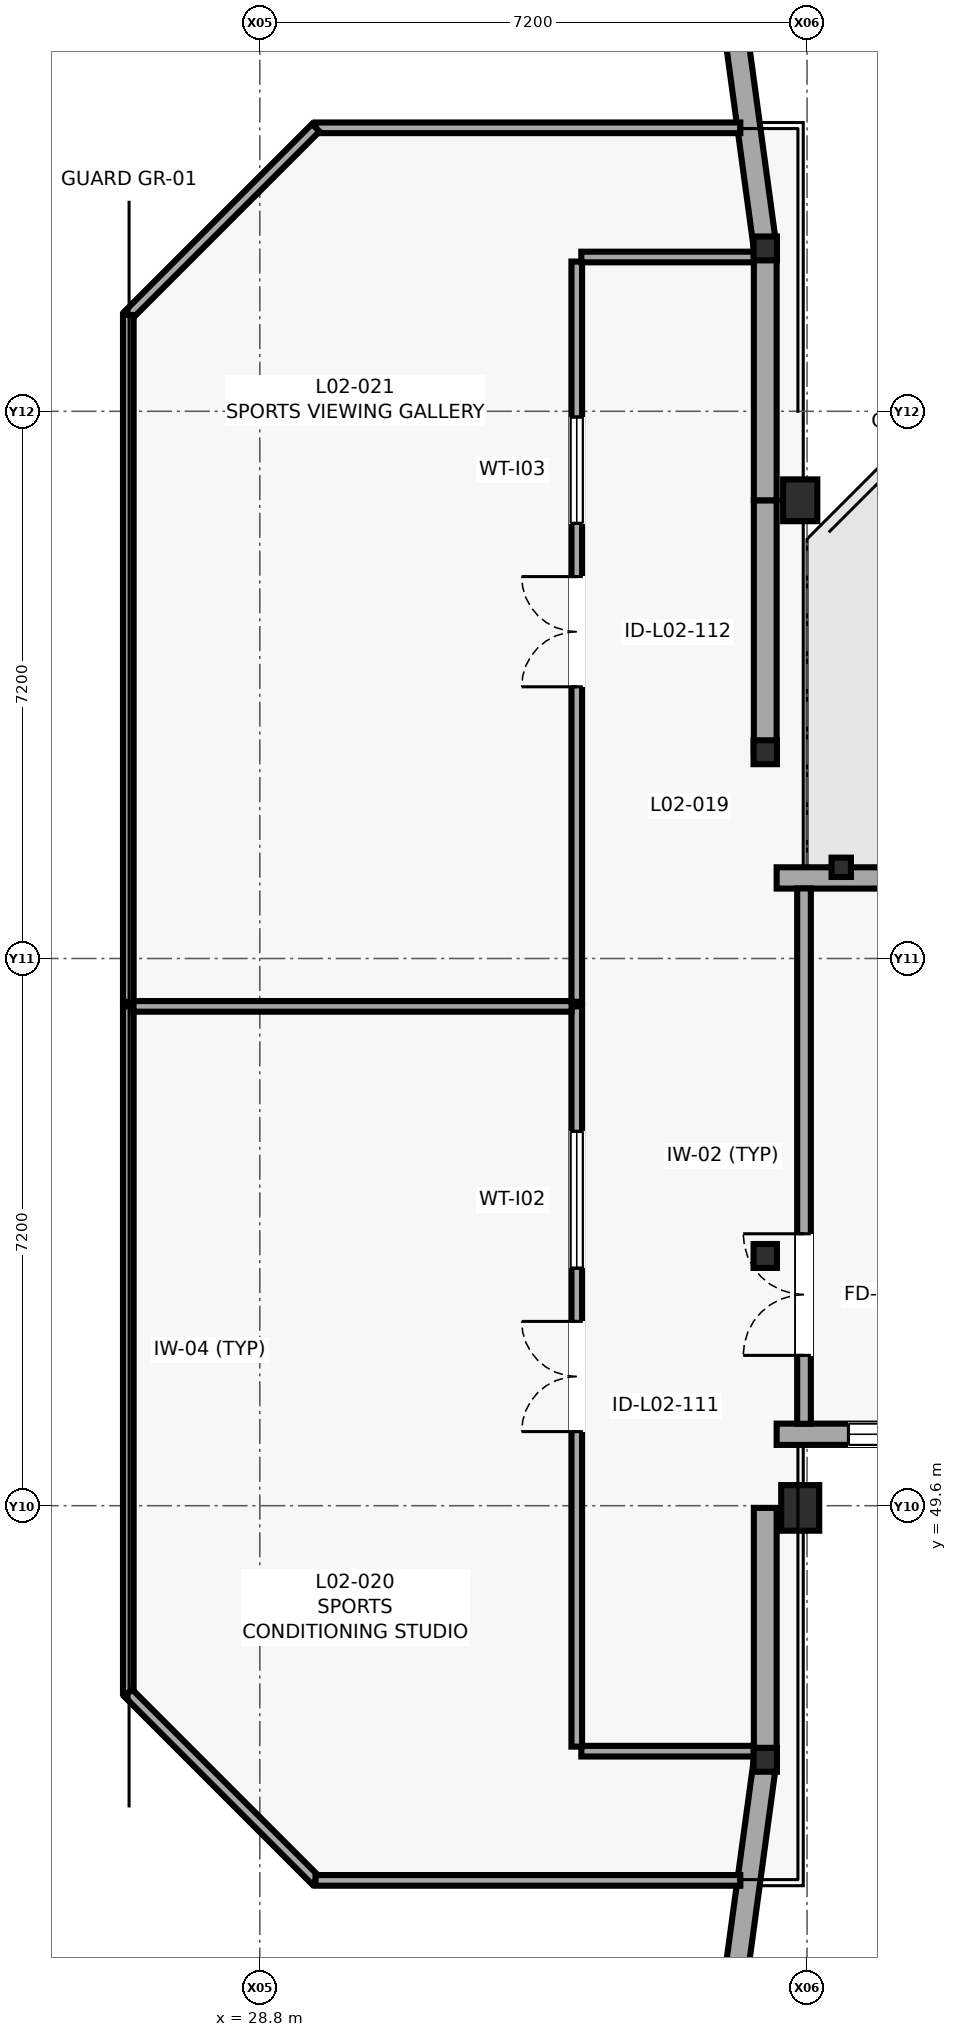
"""IFC4 building model, lengths in metres.
Left out: names, types, materials, properties, quantities, classifications, styles, units other than length and angle.
Written with IfcOpenShell. Run it as: python <this file> out.ifc"""

import sys

from ifc_helpers import new_model, si_unit, direction, frame, frame_2d, origin, origin_2d, place, context, subcontext, project, spatial, rectangle, i_section, extrude, element, fill, save


model = new_model("IFC4")
c1 = context("Model", 3, precision=1e-05, world=origin(), true_north=direction((0.0, 1.0)))
c2 = subcontext(c1, "Body", "Model", "MODEL_VIEW")
j1 = project(units=[si_unit("LENGTHUNIT", "METRE"), si_unit("PLANEANGLEUNIT", "RADIAN")], contexts=[c1])
p1 = place(None, origin())
s1 = spatial("IfcSite", under=j1, at=p1, CompositionType="ELEMENT")
p2 = place(p1, origin())
s2 = spatial("IfcBuilding", under=s1, at=p2, CompositionType="ELEMENT")
p3 = place(p2, frame((0.0, 0.0, 8.2)))
s3 = spatial("IfcBuildingStorey", under=s2, at=p3, CompositionType="ELEMENT", Elevation=8.2)
for number, where, z_axis, x_axis in (
    (1, (35.45, 46.257, 0.0), (0.0, 0.0, 1.0), (1.0, 0.0, 0.0)),
    (2, (35.45, 52.886, 0.0), (0.0, 0.0, 1.0), (1.0, 0.0, 0.0)),
    (3, (35.45, 59.514, 0.0), (0.0, 0.0, 1.0), (1.0, 0.0, 0.0)),
    (4, (35.45, 66.143, 0.0), (0.0, 0.0, 1.0), (1.0, 0.0, 0.0)),
):
    element("IfcColumn", number, at=place(p3, frame(where, z_axis=z_axis, x_axis=x_axis)), inside=s3, PredefinedType="COLUMN", context=c2, shape_type="SweptSolid", body=[
        extrude(i_section(OverallWidth=0.307, OverallDepth=0.314, WebThickness=0.012, FlangeThickness=0.019, FilletRadius=0.015, at=origin_2d()), origin(), (0.0, 0.0, 1.0), 4.0),
    ])
p4 = place(p3, frame((35.91, 49.571, 0.0), z_axis=(0.0, 0.0, 1.0), x_axis=(1.0, 0.0, 0.0)))
e5 = element("IfcColumn", 5, at=p4, inside=s3, PredefinedType="PILASTER", context=c2, shape_type="SweptSolid", body=[
    extrude(rectangle(XDim=0.5, YDim=0.6, at=origin_2d()), origin(), (0.0, 0.0, 1.0), 4.0),
])
p5 = place(p3, frame((35.91, 62.829, 0.0), z_axis=(0.0, 0.0, 1.0), x_axis=(1.0, 0.0, 0.0)))
e6 = element("IfcColumn", 6, at=p5, inside=s3, PredefinedType="PILASTER", context=c2, shape_type="SweptSolid", body=[
    extrude(rectangle(XDim=0.45, YDim=0.55, at=origin_2d()), origin(), (0.0, 0.0, 1.0), 4.0),
])
p6 = place(p3, frame((36.45, 58.0, 0.0), z_axis=(0.0, 0.0, 1.0), x_axis=(1.0, 0.0, 0.0)))
e7 = element("IfcColumn", 7, at=p6, inside=s3, PredefinedType="COLUMN", context=c2, shape_type="SweptSolid", body=[
    extrude(i_section(OverallWidth=0.255, OverallDepth=0.254, WebThickness=0.009, FlangeThickness=0.014, FilletRadius=0.013, at=origin_2d()), origin(), (0.0, 0.0, 1.0), 4.0),
])
p7 = place(p3, frame((35.0, 42.943, 0.0), z_axis=(0.0, 0.0, 1.0), x_axis=(0.134539839792, 0.990908185206, 0.0)))
e8 = element("IfcWall", 8, at=p7, inside=s3, PredefinedType="SOLIDWALL", context=c2, shape_type="SweptSolid", body=[
    extrude(rectangle(XDim=3.344, YDim=0.3, at=frame_2d((1.672, 0.0))), origin(), (0.0, 0.0, 1.0), 3.745),
])
p8 = place(p3, frame((35.45, 46.257, 0.0), z_axis=(0.0, 0.0, 1.0), x_axis=(0.0, 1.0, 0.0)))
e9 = element("IfcWall", 9, at=p8, inside=s3, PredefinedType="SOLIDWALL", context=c2, shape_type="SweptSolid", body=[
    extrude(rectangle(XDim=3.314, YDim=0.3, at=frame_2d((1.657, 0.0))), origin(), (0.0, 0.0, 1.0), 3.505),
])
p9 = place(p3, frame((35.45, 59.514, 0.0), z_axis=(0.0, 0.0, 1.0), x_axis=(0.0, 1.0, 0.0)))
e10 = element("IfcWall", 10, at=p9, inside=s3, PredefinedType="SOLIDWALL", context=c2, shape_type="SweptSolid", body=[
    extrude(rectangle(XDim=3.315, YDim=0.3, at=frame_2d((1.658, 0.0))), origin(), (0.0, 0.0, 1.0), 3.505),
])
p10 = place(p3, frame((35.45, 62.829, 0.0), z_axis=(0.0, 0.0, 1.0), x_axis=(0.0, 1.0, 0.0)))
e11 = element("IfcWall", 11, at=p10, inside=s3, PredefinedType="SOLIDWALL", context=c2, shape_type="SweptSolid", body=[
    extrude(rectangle(XDim=3.314, YDim=0.3, at=frame_2d((1.657, 0.0))), origin(), (0.0, 0.0, 1.0), 3.505),
])
p11 = place(p3, frame((35.45, 66.143, 0.0), z_axis=(0.0, 0.0, 1.0), x_axis=(-0.134539839792, 0.990908185206, 0.0)))
e12 = element("IfcWall", 12, at=p11, inside=s3, PredefinedType="SOLIDWALL", context=c2, shape_type="SweptSolid", body=[
    extrude(rectangle(XDim=3.344, YDim=0.3, at=frame_2d((1.672, 0.0))), origin(), (0.0, 0.0, 1.0), 3.745),
])
p12 = place(p3, frame((43.48, 57.86, 0.0), z_axis=(0.0, 0.0, 1.0), x_axis=(-1.0, 0.0, 0.0)))
e13 = element("IfcWall", 13, at=p12, inside=s3, PredefinedType="SOLIDWALL", context=c2, shape_type="SweptSolid", body=[
    extrude(rectangle(XDim=7.88, YDim=0.28, at=frame_2d((3.94, 0.0))), origin(), (0.0, 0.0, 1.0), 2.96),
])
p13 = place(p12, frame((1.12, 0.0, 0.85)))
e14 = element("IfcOpeningElement", 14, at=p13, cuts=e13, PredefinedType="OPENING", context=c2, shape_type="SweptSolid", body=[
    extrude(rectangle(XDim=1.7, YDim=1.75, at=frame_2d((0.85, 0.875))), frame((0.0, 0.15, 0.0), z_axis=(0.0, -1.0, 0.0), x_axis=(1.0, 0.0, 0.0)), (0.0, 0.0, 1.0), 0.3),
])
p14 = place(p12, frame((4.51, 0.0, 0.85)))
e15 = element("IfcOpeningElement", 15, at=p14, cuts=e13, PredefinedType="OPENING", context=c2, shape_type="SweptSolid", body=[
    extrude(rectangle(XDim=1.9, YDim=1.65, at=frame_2d((0.95, 0.825))), frame((0.0, 0.15, 0.0), z_axis=(0.0, -1.0, 0.0), x_axis=(1.0, 0.0, 0.0)), (0.0, 0.0, 1.0), 0.3),
])
p15 = place(p3, frame((35.6, 50.54, 0.0), z_axis=(0.0, 0.0, 1.0), x_axis=(1.0, 0.0, 0.0)))
e16 = element("IfcWall", 16, at=p15, inside=s3, PredefinedType="SOLIDWALL", context=c2, shape_type="SweptSolid", body=[
    extrude(rectangle(XDim=7.88, YDim=0.28, at=frame_2d((3.94, 0.0))), origin(), (0.0, 0.0, 1.0), 3.78),
])
p16 = place(p15, frame((0.945, 0.0, 1.05)))
e17 = element("IfcOpeningElement", 17, at=p16, cuts=e16, PredefinedType="OPENING", context=c2, shape_type="SweptSolid", body=[
    extrude(rectangle(XDim=2.05, YDim=1.55, at=frame_2d((1.025, 0.775))), frame((0.0, 0.15, 0.0), z_axis=(0.0, -1.0, 0.0), x_axis=(1.0, 0.0, 0.0)), (0.0, 0.0, 1.0), 0.3),
])
p17 = place(p15, frame((4.76, 0.0, 1.05)))
e18 = element("IfcOpeningElement", 18, at=p17, cuts=e16, PredefinedType="OPENING", context=c2, shape_type="SweptSolid", body=[
    extrude(rectangle(XDim=2.3, YDim=1.45, at=frame_2d((1.15, 0.725))), frame((0.0, 0.15, 0.0), z_axis=(0.0, -1.0, 0.0), x_axis=(1.0, 0.0, 0.0)), (0.0, 0.0, 1.0), 0.3),
])
p18 = place(p3, frame((35.96, 50.678, 0.0), z_axis=(0.0, 0.0, 1.0), x_axis=(0.0, 1.0, 0.0)))
e19 = element("IfcWall", 19, at=p18, inside=s3, PredefinedType="PARTITIONING", context=c2, shape_type="SweptSolid", body=[
    extrude(rectangle(XDim=7.044, YDim=0.18, at=frame_2d((3.522, 0.0))), origin(), (0.0, 0.0, 1.0), 3.78),
])
p19 = place(p18, frame((0.9, 0.0, 0.0)))
e20 = element("IfcOpeningElement", 20, at=p19, cuts=e19, PredefinedType="OPENING", context=c2, shape_type="SweptSolid", body=[
    extrude(rectangle(XDim=1.6, YDim=2.25, at=frame_2d((0.8, 1.125))), frame((0.0, 0.1, 0.0), z_axis=(0.0, -1.0, 0.0), x_axis=(1.0, 0.0, 0.0)), (0.0, 0.0, 1.0), 0.2),
])
p20 = place(p3, frame((27.07, 56.17, 0.0), z_axis=(0.0, 0.0, 1.0), x_axis=(0.0, -1.0, 0.0)))
e21 = element("IfcWall", 21, at=p20, inside=s3, PredefinedType="PARTITIONING", context=c2, shape_type="SweptSolid", body=[
    extrude(rectangle(XDim=9.035, YDim=0.14, at=frame_2d((4.518, 0.0))), origin(), (0.0, 0.0, 1.0), 3.755),
])
p21 = place(p3, frame((27.069, 47.136, 0.0), z_axis=(0.0, 0.0, 1.0), x_axis=(0.707071776767, -0.707141783873, 0.0)))
e22 = element("IfcWall", 22, at=p21, inside=s3, PredefinedType="PARTITIONING", context=c2, shape_type="SweptSolid", body=[
    extrude(rectangle(XDim=3.487, YDim=0.14, at=frame_2d((1.744, 0.0))), origin(), (0.0, 0.0, 1.0), 3.755),
])
p22 = place(p3, frame((29.533, 44.67, 0.0), z_axis=(0.0, 0.0, 1.0), x_axis=(1.0, 0.0, 0.0)))
e23 = element("IfcWall", 23, at=p22, inside=s3, PredefinedType="PARTITIONING", context=c2, shape_type="SweptSolid", body=[
    extrude(rectangle(XDim=5.589, YDim=0.14, at=frame_2d((2.794, 0.0))), origin(), (0.0, 0.0, 1.0), 3.755),
])
p23 = place(p3, frame((35.302, 46.37, 0.0), z_axis=(0.0, 0.0, 1.0), x_axis=(-1.0, 0.0, 0.0)))
e24 = element("IfcWall", 24, at=p23, inside=s3, PredefinedType="PARTITIONING", context=c2, shape_type="SweptSolid", body=[
    extrude(rectangle(XDim=2.272, YDim=0.14, at=frame_2d((1.136, 0.0))), origin(), (0.0, 0.0, 1.0), 3.755),
])
p24 = place(p3, frame((32.97, 46.43, 0.0), z_axis=(0.0, 0.0, 1.0), x_axis=(0.0, 1.0, 0.0)))
e25 = element("IfcWall", 25, at=p24, inside=s3, PredefinedType="PARTITIONING", context=c2, shape_type="SweptSolid", body=[
    extrude(rectangle(XDim=9.74, YDim=0.14, at=frame_2d((4.87, 0.0))), origin(), (0.0, 0.0, 1.0), 3.755),
])
p25 = place(p24, frame((4.145, 0.0, 0.0)))
e26 = element("IfcOpeningElement", 26, at=p25, cuts=e25, PredefinedType="OPENING", context=c2, shape_type="SweptSolid", body=[
    extrude(rectangle(XDim=1.45, YDim=2.28, at=frame_2d((0.725, 1.14))), frame((0.0, 0.08, 0.0), z_axis=(0.0, -1.0, 0.0), x_axis=(1.0, 0.0, 0.0)), (0.0, 0.0, 1.0), 0.16),
])
p26 = place(p24, frame((6.295, 0.0, 1.05)))
e27 = element("IfcOpeningElement", 27, at=p26, cuts=e25, PredefinedType="OPENING", context=c2, shape_type="SweptSolid", body=[
    extrude(rectangle(XDim=1.8, YDim=1.2, at=frame_2d((0.9, 0.6))), frame((0.0, 0.08, 0.0), z_axis=(0.0, -1.0, 0.0), x_axis=(1.0, 0.0, 0.0)), (0.0, 0.0, 1.0), 0.16),
])
p27 = place(p3, frame((32.902, 56.17, 0.0), z_axis=(0.0, 0.0, 1.0), x_axis=(-1.0, 0.0, 0.0)))
e28 = element("IfcWall", 28, at=p27, inside=s3, PredefinedType="PARTITIONING", context=c2, shape_type="SweptSolid", body=[
    extrude(rectangle(XDim=5.764, YDim=0.14, at=frame_2d((2.882, 0.0))), origin(), (0.0, 0.0, 1.0), 3.755),
])
p28 = place(p3, frame((35.122, 67.73, 0.0), z_axis=(0.0, 0.0, 1.0), x_axis=(-1.0, 0.0, 0.0)))
e29 = element("IfcWall", 29, at=p28, inside=s3, PredefinedType="PARTITIONING", context=c2, shape_type="SweptSolid", body=[
    extrude(rectangle(XDim=5.587, YDim=0.14, at=frame_2d((2.793, 0.0))), origin(), (0.0, 0.0, 1.0), 3.755),
])
p29 = place(p3, frame((29.536, 67.731, 0.0), z_axis=(0.0, 0.0, 1.0), x_axis=(-0.707071776767, -0.707141783873, 0.0)))
e30 = element("IfcWall", 30, at=p29, inside=s3, PredefinedType="PARTITIONING", context=c2, shape_type="SweptSolid", body=[
    extrude(rectangle(XDim=3.487, YDim=0.14, at=frame_2d((1.744, 0.0))), origin(), (0.0, 0.0, 1.0), 3.755),
])
p30 = place(p3, frame((27.07, 65.267, 0.0), z_axis=(0.0, 0.0, 1.0), x_axis=(0.0, -1.0, 0.0)))
e31 = element("IfcWall", 31, at=p30, inside=s3, PredefinedType="PARTITIONING", context=c2, shape_type="SweptSolid", body=[
    extrude(rectangle(XDim=9.037, YDim=0.14, at=frame_2d((4.519, 0.0))), origin(), (0.0, 0.0, 1.0), 3.755),
])
p31 = place(p3, frame((32.97, 56.23, 0.0), z_axis=(0.0, 0.0, 1.0), x_axis=(0.0, 1.0, 0.0)))
e32 = element("IfcWall", 32, at=p31, inside=s3, PredefinedType="PARTITIONING", context=c2, shape_type="SweptSolid", body=[
    extrude(rectangle(XDim=9.74, YDim=0.14, at=frame_2d((4.87, 0.0))), origin(), (0.0, 0.0, 1.0), 3.755),
])
p32 = place(p31, frame((4.145, 0.0, 0.0)))
e33 = element("IfcOpeningElement", 33, at=p32, cuts=e32, PredefinedType="OPENING", context=c2, shape_type="SweptSolid", body=[
    extrude(rectangle(XDim=1.45, YDim=2.28, at=frame_2d((0.725, 1.14))), frame((0.0, 0.08, 0.0), z_axis=(0.0, -1.0, 0.0), x_axis=(1.0, 0.0, 0.0)), (0.0, 0.0, 1.0), 0.16),
])
p33 = place(p31, frame((6.295, 0.0, 1.05)))
e34 = element("IfcOpeningElement", 34, at=p33, cuts=e32, PredefinedType="OPENING", context=c2, shape_type="SweptSolid", body=[
    extrude(rectangle(XDim=1.4, YDim=1.05, at=frame_2d((0.7, 0.525))), frame((0.0, 0.08, 0.0), z_axis=(0.0, -1.0, 0.0), x_axis=(1.0, 0.0, 0.0)), (0.0, 0.0, 1.0), 0.16),
])
p34 = place(p3, frame((33.03, 66.03, 0.0), z_axis=(0.0, 0.0, 1.0), x_axis=(1.0, 0.0, 0.0)))
e35 = element("IfcWall", 35, at=p34, inside=s3, PredefinedType="PARTITIONING", context=c2, shape_type="SweptSolid", body=[
    extrude(rectangle(XDim=2.272, YDim=0.14, at=frame_2d((1.136, 0.0))), origin(), (0.0, 0.0, 1.0), 3.755),
])
p35 = place(p16, origin())
e36 = element("IfcWindow", 36, at=p35, inside=s3, PartitioningType="SINGLE_PANEL", PredefinedType="WINDOW", context=c2, shape_type="SweptSolid", body=[
    extrude(rectangle(XDim=2.05, YDim=1.55, at=frame_2d((1.025, 0.775))), frame((0.0, 0.03, 0.0), z_axis=(0.0, -1.0, 0.0), x_axis=(1.0, 0.0, 0.0)), (0.0, 0.0, 1.0), 0.06),
])
fill(e17, e36)
p36 = place(p19, origin())
e37 = element("IfcDoor", 37, at=p36, inside=s3, OperationType="DOUBLE_DOOR_SINGLE_SWING", PredefinedType="DOOR", context=c2, shape_type="SweptSolid", body=[
    extrude(rectangle(XDim=1.6, YDim=2.25, at=frame_2d((0.8, 1.125))), frame((0.0, 0.025, 0.0), z_axis=(0.0, -1.0, 0.0), x_axis=(1.0, 0.0, 0.0)), (0.0, 0.0, 1.0), 0.05),
])
fill(e20, e37)
p37 = place(p25, origin())
e38 = element("IfcDoor", 38, at=p37, inside=s3, OperationType="DOUBLE_DOOR_SINGLE_SWING", PredefinedType="DOOR", context=c2, shape_type="SweptSolid", body=[
    extrude(rectangle(XDim=1.45, YDim=2.28, at=frame_2d((0.725, 1.14))), frame((0.0, 0.025, 0.0), z_axis=(0.0, -1.0, 0.0), x_axis=(1.0, 0.0, 0.0)), (0.0, 0.0, 1.0), 0.05),
])
fill(e26, e38)
p38 = place(p26, origin())
e39 = element("IfcWindow", 39, at=p38, inside=s3, PartitioningType="SINGLE_PANEL", PredefinedType="WINDOW", context=c2, shape_type="SweptSolid", body=[
    extrude(rectangle(XDim=1.8, YDim=1.2, at=frame_2d((0.9, 0.6))), frame((0.0, 0.03, 0.0), z_axis=(0.0, -1.0, 0.0), x_axis=(1.0, 0.0, 0.0)), (0.0, 0.0, 1.0), 0.06),
])
fill(e27, e39)
p39 = place(p32, origin())
e40 = element("IfcDoor", 40, at=p39, inside=s3, OperationType="DOUBLE_DOOR_SINGLE_SWING", PredefinedType="DOOR", context=c2, shape_type="SweptSolid", body=[
    extrude(rectangle(XDim=1.45, YDim=2.28, at=frame_2d((0.725, 1.14))), frame((0.0, 0.025, 0.0), z_axis=(0.0, -1.0, 0.0), x_axis=(1.0, 0.0, 0.0)), (0.0, 0.0, 1.0), 0.05),
])
fill(e33, e40)
p40 = place(p33, origin())
e41 = element("IfcWindow", 41, at=p40, inside=s3, PartitioningType="SINGLE_PANEL", PredefinedType="WINDOW", context=c2, shape_type="SweptSolid", body=[
    extrude(rectangle(XDim=1.4, YDim=1.05, at=frame_2d((0.7, 0.525))), frame((0.0, 0.03, 0.0), z_axis=(0.0, -1.0, 0.0), x_axis=(1.0, 0.0, 0.0)), (0.0, 0.0, 1.0), 0.06),
])
fill(e34, e41)
save(model, sys.argv[1])
